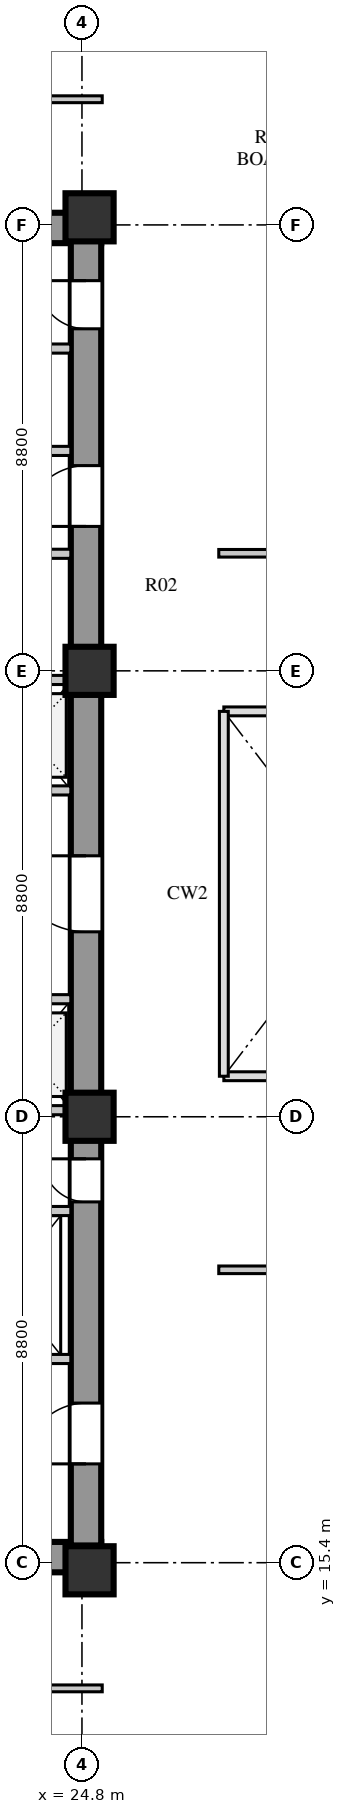
"""IFC4 building model, lengths in metres.
Left out: names, types, materials, properties, quantities, classifications, styles, units other than length and angle.
Written with IfcOpenShell. Run it as: python <this file> out.ifc"""

import sys

from ifc_helpers import new_model, si_unit, direction, frame, frame_2d, origin, origin_2d, place, context, subcontext, project, spatial, rectangle, extrude, element, fill, save


model = new_model("IFC4")
c1 = context("Model", 3, precision=1e-05, world=origin(), true_north=direction((0.0, 1.0)))
c2 = subcontext(c1, "Body", "Model", "MODEL_VIEW")
j1 = project(units=[si_unit("LENGTHUNIT", "METRE"), si_unit("PLANEANGLEUNIT", "RADIAN")], contexts=[c1])
p1 = place(None, origin())
s1 = spatial("IfcSite", under=j1, at=p1, CompositionType="ELEMENT")
p2 = place(p1, origin())
s2 = spatial("IfcBuilding", under=s1, at=p2, CompositionType="ELEMENT")
p3 = place(p2, frame((0.0, 0.0, 17.0)))
s3 = spatial("IfcBuildingStorey", under=s2, at=p3, CompositionType="ELEMENT", Elevation=17.0)
for number, where, z_axis, x_axis in (
    (1, (15.3, 15.51, 0.0), (0.0, 0.0, 1.0), (1.0, 0.0, 0.0)),
    (2, (15.3, 41.74, 0.0), (0.0, 0.0, 1.0), (1.0, 0.0, 0.0)),
):
    element("IfcWall", number, at=place(p3, frame(where, z_axis=z_axis, x_axis=x_axis)), inside=s3, PredefinedType="SHEAR", context=c2, shape_type="SweptSolid", body=[
        extrude(rectangle(XDim=9.88, YDim=0.6, at=frame_2d((4.94, 0.0))), origin(), (0.0, 0.0, 1.0), 4.22),
    ])
p4 = place(p3, frame((24.88, 15.74, 0.0), z_axis=(0.0, 0.0, 1.0), x_axis=(0.0, 1.0, 0.0)))
e3 = element("IfcWall", 3, at=p4, inside=s3, PredefinedType="SHEAR", context=c2, shape_type="SweptSolid", body=[
    extrude(rectangle(XDim=25.76, YDim=0.6, at=frame_2d((12.88, 0.0))), origin(), (0.0, 0.0, 1.0), 4.22),
])
p5 = place(p4, frame((1.61, 0.0, 0.0)))
e4 = element("IfcOpeningElement", 4, at=p5, cuts=e3, PredefinedType="OPENING", context=c2, shape_type="SweptSolid", body=[
    extrude(rectangle(XDim=1.2, YDim=2.1, at=frame_2d((0.6, 1.05))), frame((0.0, 0.31, 0.0), z_axis=(0.0, -1.0, 0.0), x_axis=(1.0, 0.0, 0.0)), (0.0, 0.0, 1.0), 0.62),
])
p6 = place(p4, frame((6.78, 0.0, 0.0)))
e5 = element("IfcOpeningElement", 5, at=p6, cuts=e3, PredefinedType="OPENING", context=c2, shape_type="SweptSolid", body=[
    extrude(rectangle(XDim=0.85, YDim=2.06, at=frame_2d((0.425, 1.03))), frame((0.0, 0.31, 0.0), z_axis=(0.0, -1.0, 0.0), x_axis=(1.0, 0.0, 0.0)), (0.0, 0.0, 1.0), 0.62),
])
p7 = place(p4, frame((12.11, 0.0, 0.0)))
e6 = element("IfcOpeningElement", 6, at=p7, cuts=e3, PredefinedType="OPENING", context=c2, shape_type="SweptSolid", body=[
    extrude(rectangle(XDim=1.5, YDim=2.12, at=frame_2d((0.75, 1.06))), frame((0.0, 0.31, 0.0), z_axis=(0.0, -1.0, 0.0), x_axis=(1.0, 0.0, 0.0)), (0.0, 0.0, 1.0), 0.62),
])
p8 = place(p4, frame((20.11, 0.0, 0.0)))
e7 = element("IfcOpeningElement", 7, at=p8, cuts=e3, PredefinedType="OPENING", context=c2, shape_type="SweptSolid", body=[
    extrude(rectangle(XDim=1.2, YDim=2.12, at=frame_2d((0.6, 1.06))), frame((0.0, 0.31, 0.0), z_axis=(0.0, -1.0, 0.0), x_axis=(1.0, 0.0, 0.0)), (0.0, 0.0, 1.0), 0.62),
])
p9 = place(p4, frame((24.01, 0.0, 0.0)))
e8 = element("IfcOpeningElement", 8, at=p9, cuts=e3, PredefinedType="OPENING", context=c2, shape_type="SweptSolid", body=[
    extrude(rectangle(XDim=0.95, YDim=2.1, at=frame_2d((0.475, 1.05))), frame((0.0, 0.31, 0.0), z_axis=(0.0, -1.0, 0.0), x_axis=(1.0, 0.0, 0.0)), (0.0, 0.0, 1.0), 0.62),
])
for number, where, z_axis, x_axis in (
    (9, (24.95, 15.25, 0.0), (0.0, 0.0, 1.0), (1.0, 0.0, 0.0)),
    (10, (24.95, 24.2, 0.0), (0.0, 0.0, 1.0), (1.0, 0.0, 0.0)),
    (11, (24.95, 33.0, 0.0), (0.0, 0.0, 1.0), (1.0, 0.0, 0.0)),
    (12, (24.95, 41.95, 0.0), (0.0, 0.0, 1.0), (1.0, 0.0, 0.0)),
):
    element("IfcColumn", number, at=place(p3, frame(where, z_axis=z_axis, x_axis=x_axis)), inside=s3, PredefinedType="COLUMN", context=c2, shape_type="SweptSolid", body=[
        extrude(rectangle(XDim=0.95, YDim=0.95, at=origin_2d()), origin(), (0.0, 0.0, 1.0), 4.22),
    ])
p10 = place(p3, frame((19.64, 19.42, 0.0), z_axis=(0.0, 0.0, 1.0), x_axis=(1.0, 0.0, 0.0)))
e13 = element("IfcWall", 13, at=p10, inside=s3, PredefinedType="SOLIDWALL", context=c2, shape_type="SweptSolid", body=[
    extrude(rectangle(XDim=4.94, YDim=0.18, at=frame_2d((2.47, 0.0))), origin(), (0.0, 0.0, 1.0), 4.22),
])
p11 = place(p10, frame((0.72, 0.0, 0.0)))
e14 = element("IfcOpeningElement", 14, at=p11, cuts=e13, PredefinedType="OPENING", context=c2, shape_type="SweptSolid", body=[
    extrude(rectangle(XDim=1.1, YDim=2.1, at=frame_2d((0.55, 1.05))), frame((0.0, 0.1, 0.0), z_axis=(0.0, -1.0, 0.0), x_axis=(1.0, 0.0, 0.0)), (0.0, 0.0, 1.0), 0.2),
])
p12 = place(p10, frame((3.02, 0.0, 0.0)))
e15 = element("IfcOpeningElement", 15, at=p12, cuts=e13, PredefinedType="OPENING", context=c2, shape_type="SweptSolid", body=[
    extrude(rectangle(XDim=1.1, YDim=2.1, at=frame_2d((0.55, 1.05))), frame((0.0, 0.1, 0.0), z_axis=(0.0, -1.0, 0.0), x_axis=(1.0, 0.0, 0.0)), (0.0, 0.0, 1.0), 0.2),
])
p13 = place(p3, frame((19.64, 22.34, 0.0), z_axis=(0.0, 0.0, 1.0), x_axis=(1.0, 0.0, 0.0)))
e16 = element("IfcWall", 16, at=p13, inside=s3, PredefinedType="SOLIDWALL", context=c2, shape_type="SweptSolid", body=[
    extrude(rectangle(XDim=4.94, YDim=0.18, at=frame_2d((2.47, 0.0))), origin(), (0.0, 0.0, 1.0), 4.22),
])
p14 = place(p3, frame((15.9, 26.52, 0.0), z_axis=(0.0, 0.0, 1.0), x_axis=(1.0, 0.0, 0.0)))
e17 = element("IfcWall", 17, at=p14, inside=s3, PredefinedType="SOLIDWALL", context=c2, shape_type="SweptSolid", body=[
    extrude(rectangle(XDim=8.68, YDim=0.18, at=frame_2d((4.34, 0.0))), origin(), (0.0, 0.0, 1.0), 4.22),
])
p15 = place(p14, frame((1.76, 0.0, 0.0)))
e18 = element("IfcOpeningElement", 18, at=p15, cuts=e17, PredefinedType="OPENING", context=c2, shape_type="SweptSolid", body=[
    extrude(rectangle(XDim=1.0, YDim=2.1, at=frame_2d((0.5, 1.05))), frame((0.0, 0.1, 0.0), z_axis=(0.0, -1.0, 0.0), x_axis=(1.0, 0.0, 0.0)), (0.0, 0.0, 1.0), 0.2),
])
p16 = place(p14, frame((3.6, 0.0, 0.0)))
e19 = element("IfcOpeningElement", 19, at=p16, cuts=e17, PredefinedType="OPENING", context=c2, shape_type="SweptSolid", body=[
    extrude(rectangle(XDim=1.0, YDim=2.1, at=frame_2d((0.5, 1.05))), frame((0.0, 0.1, 0.0), z_axis=(0.0, -1.0, 0.0), x_axis=(1.0, 0.0, 0.0)), (0.0, 0.0, 1.0), 0.2),
])
p17 = place(p14, frame((5.44, 0.0, 0.0)))
e20 = element("IfcOpeningElement", 20, at=p17, cuts=e17, PredefinedType="OPENING", context=c2, shape_type="SweptSolid", body=[
    extrude(rectangle(XDim=1.0, YDim=2.1, at=frame_2d((0.5, 1.05))), frame((0.0, 0.1, 0.0), z_axis=(0.0, -1.0, 0.0), x_axis=(1.0, 0.0, 0.0)), (0.0, 0.0, 1.0), 0.2),
])
p18 = place(p14, frame((7.28, 0.0, 0.0)))
e21 = element("IfcOpeningElement", 21, at=p18, cuts=e17, PredefinedType="OPENING", context=c2, shape_type="SweptSolid", body=[
    extrude(rectangle(XDim=1.0, YDim=2.1, at=frame_2d((0.5, 1.05))), frame((0.0, 0.1, 0.0), z_axis=(0.0, -1.0, 0.0), x_axis=(1.0, 0.0, 0.0)), (0.0, 0.0, 1.0), 0.2),
])
p19 = place(p3, frame((15.9, 24.33, 0.0), z_axis=(0.0, 0.0, 1.0), x_axis=(1.0, 0.0, 0.0)))
e22 = element("IfcWall", 22, at=p19, inside=s3, PredefinedType="SOLIDWALL", context=c2, shape_type="SweptSolid", body=[
    extrude(rectangle(XDim=8.68, YDim=0.18, at=frame_2d((4.34, 0.0))), origin(), (0.0, 0.0, 1.0), 3.42),
])
p20 = place(p3, frame((15.9, 30.64, 0.0), z_axis=(0.0, 0.0, 1.0), x_axis=(1.0, 0.0, 0.0)))
e23 = element("IfcWall", 23, at=p20, inside=s3, PredefinedType="SOLIDWALL", context=c2, shape_type="SweptSolid", body=[
    extrude(rectangle(XDim=8.68, YDim=0.18, at=frame_2d((4.34, 0.0))), origin(), (0.0, 0.0, 1.0), 4.22),
])
p21 = place(p20, frame((1.76, 0.0, 0.0)))
e24 = element("IfcOpeningElement", 24, at=p21, cuts=e23, PredefinedType="OPENING", context=c2, shape_type="SweptSolid", body=[
    extrude(rectangle(XDim=1.0, YDim=2.1, at=frame_2d((0.5, 1.05))), frame((0.0, 0.1, 0.0), z_axis=(0.0, -1.0, 0.0), x_axis=(1.0, 0.0, 0.0)), (0.0, 0.0, 1.0), 0.2),
])
p22 = place(p20, frame((3.6, 0.0, 0.0)))
e25 = element("IfcOpeningElement", 25, at=p22, cuts=e23, PredefinedType="OPENING", context=c2, shape_type="SweptSolid", body=[
    extrude(rectangle(XDim=1.0, YDim=2.1, at=frame_2d((0.5, 1.05))), frame((0.0, 0.1, 0.0), z_axis=(0.0, -1.0, 0.0), x_axis=(1.0, 0.0, 0.0)), (0.0, 0.0, 1.0), 0.2),
])
p23 = place(p20, frame((5.44, 0.0, 0.0)))
e26 = element("IfcOpeningElement", 26, at=p23, cuts=e23, PredefinedType="OPENING", context=c2, shape_type="SweptSolid", body=[
    extrude(rectangle(XDim=1.0, YDim=2.1, at=frame_2d((0.5, 1.05))), frame((0.0, 0.1, 0.0), z_axis=(0.0, -1.0, 0.0), x_axis=(1.0, 0.0, 0.0)), (0.0, 0.0, 1.0), 0.2),
])
p24 = place(p20, frame((7.28, 0.0, 0.0)))
e27 = element("IfcOpeningElement", 27, at=p24, cuts=e23, PredefinedType="OPENING", context=c2, shape_type="SweptSolid", body=[
    extrude(rectangle(XDim=1.0, YDim=2.1, at=frame_2d((0.5, 1.05))), frame((0.0, 0.1, 0.0), z_axis=(0.0, -1.0, 0.0), x_axis=(1.0, 0.0, 0.0)), (0.0, 0.0, 1.0), 0.2),
])
p25 = place(p3, frame((15.9, 32.82, 0.0), z_axis=(0.0, 0.0, 1.0), x_axis=(1.0, 0.0, 0.0)))
e28 = element("IfcWall", 28, at=p25, inside=s3, PredefinedType="SOLIDWALL", context=c2, shape_type="SweptSolid", body=[
    extrude(rectangle(XDim=8.68, YDim=0.18, at=frame_2d((4.34, 0.0))), origin(), (0.0, 0.0, 1.0), 3.42),
])
p26 = place(p3, frame((22.02, 35.31, 0.0), z_axis=(0.0, 0.0, 1.0), x_axis=(1.0, 0.0, 0.0)))
e29 = element("IfcWall", 29, at=p26, inside=s3, PredefinedType="SOLIDWALL", context=c2, shape_type="SweptSolid", body=[
    extrude(rectangle(XDim=2.56, YDim=0.18, at=frame_2d((1.28, 0.0))), origin(), (0.0, 0.0, 1.0), 4.22),
])
p27 = place(p26, frame((0.55, 0.0, 0.0)))
e30 = element("IfcOpeningElement", 30, at=p27, cuts=e29, PredefinedType="OPENING", context=c2, shape_type="SweptSolid", body=[
    extrude(rectangle(XDim=1.0, YDim=2.1, at=frame_2d((0.5, 1.05))), frame((0.0, 0.1, 0.0), z_axis=(0.0, -1.0, 0.0), x_axis=(1.0, 0.0, 0.0)), (0.0, 0.0, 1.0), 0.2),
])
p28 = place(p3, frame((19.64, 37.34, 0.0), z_axis=(0.0, 0.0, 1.0), x_axis=(1.0, 0.0, 0.0)))
e31 = element("IfcWall", 31, at=p28, inside=s3, PredefinedType="SOLIDWALL", context=c2, shape_type="SweptSolid", body=[
    extrude(rectangle(XDim=4.94, YDim=0.18, at=frame_2d((2.47, 0.0))), origin(), (0.0, 0.0, 1.0), 4.22),
])
p29 = place(p28, frame((0.45, 0.0, 0.0)))
e32 = element("IfcOpeningElement", 32, at=p29, cuts=e31, PredefinedType="OPENING", context=c2, shape_type="SweptSolid", body=[
    extrude(rectangle(XDim=1.0, YDim=2.1, at=frame_2d((0.5, 1.05))), frame((0.0, 0.1, 0.0), z_axis=(0.0, -1.0, 0.0), x_axis=(1.0, 0.0, 0.0)), (0.0, 0.0, 1.0), 0.2),
])
p30 = place(p28, frame((2.5, 0.0, 0.0)))
e33 = element("IfcOpeningElement", 33, at=p30, cuts=e31, PredefinedType="OPENING", context=c2, shape_type="SweptSolid", body=[
    extrude(rectangle(XDim=1.0, YDim=2.1, at=frame_2d((0.5, 1.05))), frame((0.0, 0.1, 0.0), z_axis=(0.0, -1.0, 0.0), x_axis=(1.0, 0.0, 0.0)), (0.0, 0.0, 1.0), 0.2),
])
p31 = place(p3, frame((19.64, 39.36, 0.0), z_axis=(0.0, 0.0, 1.0), x_axis=(1.0, 0.0, 0.0)))
e34 = element("IfcWall", 34, at=p31, inside=s3, PredefinedType="SOLIDWALL", context=c2, shape_type="SweptSolid", body=[
    extrude(rectangle(XDim=4.94, YDim=0.18, at=frame_2d((2.47, 0.0))), origin(), (0.0, 0.0, 1.0), 4.22),
])
p32 = place(p3, frame((15.2, 12.92, 0.0), z_axis=(0.0, 0.0, 1.0), x_axis=(1.0, 0.0, 0.0)))
e35 = element("IfcWall", 35, at=p32, inside=s3, PredefinedType="PARTITIONING", context=c2, shape_type="SweptSolid", body=[
    extrude(rectangle(XDim=10.0, YDim=0.135, at=frame_2d((5.0, 0.0))), origin(), (0.0, 0.0, 1.0), 4.22),
])
p33 = place(p32, frame((3.6, 0.0, 0.0)))
e36 = element("IfcOpeningElement", 36, at=p33, cuts=e35, PredefinedType="OPENING", context=c2, shape_type="SweptSolid", body=[
    extrude(rectangle(XDim=1.05, YDim=2.1, at=frame_2d((0.525, 1.05))), frame((0.0, 0.078, 0.0), z_axis=(0.0, -1.0, 0.0), x_axis=(1.0, 0.0, 0.0)), (0.0, 0.0, 1.0), 0.155),
])
p34 = place(p3, frame((15.2, 44.28, 0.0), z_axis=(0.0, 0.0, 1.0), x_axis=(1.0, 0.0, 0.0)))
e37 = element("IfcWall", 37, at=p34, inside=s3, PredefinedType="PARTITIONING", context=c2, shape_type="SweptSolid", body=[
    extrude(rectangle(XDim=10.0, YDim=0.135, at=frame_2d((5.0, 0.0))), origin(), (0.0, 0.0, 1.0), 4.22),
])
p35 = place(p34, frame((3.6, 0.0, 0.0)))
e38 = element("IfcOpeningElement", 38, at=p35, cuts=e37, PredefinedType="OPENING", context=c2, shape_type="SweptSolid", body=[
    extrude(rectangle(XDim=1.05, YDim=2.1, at=frame_2d((0.525, 1.05))), frame((0.0, 0.078, 0.0), z_axis=(0.0, -1.0, 0.0), x_axis=(1.0, 0.0, 0.0)), (0.0, 0.0, 1.0), 0.155),
])
p36 = place(p3, frame((27.5, 21.18, 0.0), z_axis=(0.0, 0.0, 1.0), x_axis=(1.0, 0.0, 0.0)))
e39 = element("IfcWall", 39, at=p36, inside=s3, PredefinedType="PARTITIONING", context=c2, shape_type="SweptSolid", body=[
    extrude(rectangle(XDim=7.45, YDim=0.15, at=frame_2d((3.725, 0.0))), origin(), (0.0, 0.0, 1.0), 3.82),
])
p37 = place(p36, frame((5.1, 0.0, 0.0)))
e40 = element("IfcOpeningElement", 40, at=p37, cuts=e39, PredefinedType="OPENING", context=c2, shape_type="SweptSolid", body=[
    extrude(rectangle(XDim=0.95, YDim=2.08, at=frame_2d((0.475, 1.04))), frame((0.0, 0.085, 0.0), z_axis=(0.0, -1.0, 0.0), x_axis=(1.0, 0.0, 0.0)), (0.0, 0.0, 1.0), 0.17),
])
p38 = place(p36, frame((2.3, 0.0, 0.0)))
e41 = element("IfcOpeningElement", 41, at=p38, cuts=e39, PredefinedType="OPENING", context=c2, shape_type="SweptSolid", body=[
    extrude(rectangle(XDim=1.35, YDim=2.1, at=frame_2d((0.675, 1.05))), frame((0.0, 0.085, 0.0), z_axis=(0.0, -1.0, 0.0), x_axis=(1.0, 0.0, 0.0)), (0.0, 0.0, 1.0), 0.17),
])
p39 = place(p3, frame((27.5, 35.32, 0.0), z_axis=(0.0, 0.0, 1.0), x_axis=(1.0, 0.0, 0.0)))
e42 = element("IfcWall", 42, at=p39, inside=s3, PredefinedType="PARTITIONING", context=c2, shape_type="SweptSolid", body=[
    extrude(rectangle(XDim=7.22, YDim=0.15, at=frame_2d((3.61, 0.0))), origin(), (0.0, 0.0, 1.0), 4.22),
])
p40 = place(p39, frame((5.0, 0.0, 0.0)))
e43 = element("IfcOpeningElement", 43, at=p40, cuts=e42, PredefinedType="OPENING", context=c2, shape_type="SweptSolid", body=[
    extrude(rectangle(XDim=0.95, YDim=2.08, at=frame_2d((0.475, 1.04))), frame((0.0, 0.085, 0.0), z_axis=(0.0, -1.0, 0.0), x_axis=(1.0, 0.0, 0.0)), (0.0, 0.0, 1.0), 0.17),
])
p41 = place(p39, frame((2.0, 0.0, 0.0)))
e44 = element("IfcOpeningElement", 44, at=p41, cuts=e42, PredefinedType="OPENING", context=c2, shape_type="SweptSolid", body=[
    extrude(rectangle(XDim=1.35, YDim=2.1, at=frame_2d((0.675, 1.05))), frame((0.0, 0.085, 0.0), z_axis=(0.0, -1.0, 0.0), x_axis=(1.0, 0.0, 0.0)), (0.0, 0.0, 1.0), 0.17),
])
p42 = place(p5, frame((1.2, 0.0, 0.0), z_axis=(0.0, 0.0, 1.0), x_axis=(-1.0, 0.0, 0.0)))
e45 = element("IfcDoor", 45, at=p42, inside=s3, OperationType="SINGLE_SWING_RIGHT", PredefinedType="DOOR", context=c2, shape_type="SweptSolid", body=[
    extrude(rectangle(XDim=1.2, YDim=2.1, at=frame_2d((0.6, 1.05))), frame((0.0, 0.025, 0.0), z_axis=(0.0, -1.0, 0.0), x_axis=(1.0, 0.0, 0.0)), (0.0, 0.0, 1.0), 0.05),
])
fill(e4, e45)
p43 = place(p6, frame((0.85, 0.0, 0.0), z_axis=(0.0, 0.0, 1.0), x_axis=(-1.0, 0.0, 0.0)))
e46 = element("IfcDoor", 46, at=p43, inside=s3, OperationType="SINGLE_SWING_LEFT", PredefinedType="DOOR", context=c2, shape_type="SweptSolid", body=[
    extrude(rectangle(XDim=0.85, YDim=2.06, at=frame_2d((0.425, 1.03))), frame((0.0, 0.025, 0.0), z_axis=(0.0, -1.0, 0.0), x_axis=(1.0, 0.0, 0.0)), (0.0, 0.0, 1.0), 0.05),
])
fill(e5, e46)
p44 = place(p7, frame((1.5, 0.0, 0.0), z_axis=(0.0, 0.0, 1.0), x_axis=(-1.0, 0.0, 0.0)))
e47 = element("IfcDoor", 47, at=p44, inside=s3, OperationType="SINGLE_SWING_LEFT", PredefinedType="DOOR", context=c2, shape_type="SweptSolid", body=[
    extrude(rectangle(XDim=1.5, YDim=2.12, at=frame_2d((0.75, 1.06))), frame((0.0, 0.025, 0.0), z_axis=(0.0, -1.0, 0.0), x_axis=(1.0, 0.0, 0.0)), (0.0, 0.0, 1.0), 0.05),
])
fill(e6, e47)
p45 = place(p8, frame((1.2, 0.0, 0.0), z_axis=(0.0, 0.0, 1.0), x_axis=(-1.0, 0.0, 0.0)))
e48 = element("IfcDoor", 48, at=p45, inside=s3, OperationType="SINGLE_SWING_RIGHT", PredefinedType="DOOR", context=c2, shape_type="SweptSolid", body=[
    extrude(rectangle(XDim=1.2, YDim=2.12, at=frame_2d((0.6, 1.06))), frame((0.0, 0.025, 0.0), z_axis=(0.0, -1.0, 0.0), x_axis=(1.0, 0.0, 0.0)), (0.0, 0.0, 1.0), 0.05),
])
fill(e7, e48)
p46 = place(p9, frame((0.95, 0.0, 0.0), z_axis=(0.0, 0.0, 1.0), x_axis=(-1.0, 0.0, 0.0)))
e49 = element("IfcDoor", 49, at=p46, inside=s3, OperationType="SINGLE_SWING_LEFT", PredefinedType="DOOR", context=c2, shape_type="SweptSolid", body=[
    extrude(rectangle(XDim=0.95, YDim=2.1, at=frame_2d((0.475, 1.05))), frame((0.0, 0.025, 0.0), z_axis=(0.0, -1.0, 0.0), x_axis=(1.0, 0.0, 0.0)), (0.0, 0.0, 1.0), 0.05),
])
fill(e8, e49)
save(model, sys.argv[1])
